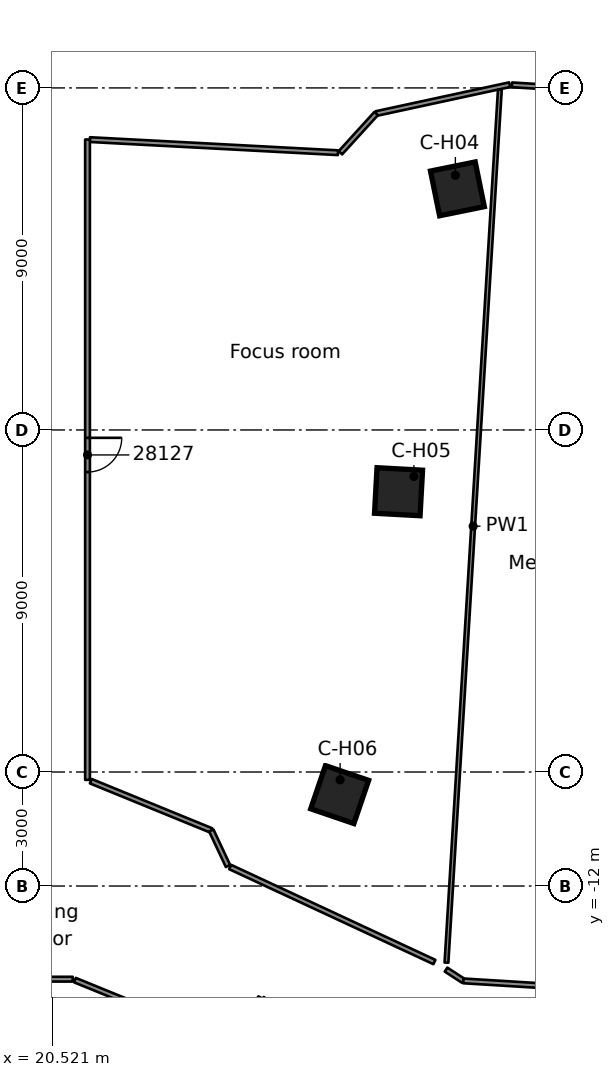
"""IFC4 building model, lengths in metres.
Left out: names, types, materials, properties, quantities, classifications, styles, units other than length and angle.
Written with IfcOpenShell. Run it as: python <this file> out.ifc"""

import sys

from ifc_helpers import new_model, si_unit, direction, frame, frame_2d, origin, origin_2d, place, context, subcontext, project, spatial, rectangle, extrude, element, fill, save


model = new_model("IFC4")
c1 = context("Model", 3, precision=1e-05, world=origin(), true_north=direction((0.0, 1.0)))
c2 = subcontext(c1, "Body", "Model", "MODEL_VIEW")
j1 = project(units=[si_unit("LENGTHUNIT", "METRE"), si_unit("PLANEANGLEUNIT", "RADIAN")], contexts=[c1])
p1 = place(None, origin())
s1 = spatial("IfcSite", under=j1, at=p1, CompositionType="ELEMENT")
p2 = place(p1, origin())
s2 = spatial("IfcBuilding", under=s1, at=p2, CompositionType="ELEMENT")
p3 = place(p2, frame((0.0, 0.0, 145.6)))
s3 = spatial("IfcBuildingStorey", under=s2, at=p3, CompositionType="ELEMENT", Elevation=145.6)
for number, where, z_axis, x_axis in (
    (1, (31.183, 6.344, 0.0), (0.0, 0.0, 1.0), (0.98, 0.199, 0.0)),
    (2, (29.634, -1.625, 0.0), (0.0, 0.0, 1.0), (0.998, -0.055, 0.0)),
    (3, (28.085, -9.594, 0.0), (0.0, 0.0, 1.0), (0.946, -0.323, 0.0)),
):
    element("IfcColumn", number, at=place(p3, frame(where, z_axis=z_axis, x_axis=x_axis)), inside=s3, PredefinedType="COLUMN", context=c2, shape_type="SweptSolid", body=[
        extrude(rectangle(XDim=1.2, YDim=1.2, at=origin_2d()), origin(), (0.0, 0.0, 1.0), 3.5),
    ])
p4 = place(p3, frame((26.05, -14.969, 0.0), z_axis=(0.0, 0.0, 1.0), x_axis=(0.802733003706, -0.596338599087, 0.0)))
e4 = element("IfcWall", 4, at=p4, inside=s3, PredefinedType="PARTITIONING", context=c2, shape_type="SweptSolid", body=[
    extrude(rectangle(XDim=4.927, YDim=0.125, at=frame_2d((2.463, 0.0))), origin(), (0.0, 0.0, 1.0), 3.08),
])
p5 = place(p3, frame((30.578, -14.0, 0.0), z_axis=(0.0, 0.0, 1.0), x_axis=(-0.906684476779, 0.421809506257, 0.0)))
e5 = element("IfcWall", 5, at=p5, inside=s3, PredefinedType="PARTITIONING", context=c2, shape_type="SweptSolid", body=[
    extrude(rectangle(XDim=5.927, YDim=0.125, at=frame_2d((2.963, 0.0))), origin(), (0.0, 0.0, 1.0), 3.08),
])
p6 = place(p3, frame((30.884, -14.199, 0.0), z_axis=(0.0, 0.0, 1.0), x_axis=(0.838402684299, -0.545051317731, 0.0)))
e6 = element("IfcWall", 6, at=p6, inside=s3, PredefinedType="PARTITIONING", context=c2, shape_type="SweptSolid", body=[
    extrude(rectangle(XDim=0.545, YDim=0.125, at=frame_2d((0.272, 0.0))), origin(), (0.0, 0.0, 1.0), 3.08),
])
p7 = place(p3, frame((21.118, -14.475, 0.0), z_axis=(0.0, 0.0, 1.0), x_axis=(0.925826662129, -0.377948398187, 0.0)))
e7 = element("IfcWall", 7, at=p7, inside=s3, PredefinedType="PARTITIONING", context=c2, shape_type="SweptSolid", body=[
    extrude(rectangle(XDim=4.487, YDim=0.125, at=frame_2d((2.243, 0.0))), origin(), (0.0, 0.0, 1.0), 3.08),
])
p8 = place(p3, frame((21.536, -9.242, 0.0), z_axis=(0.0, 0.0, 1.0), x_axis=(0.925663837475, -0.37834701002, 0.0)))
e8 = element("IfcWall", 8, at=p8, inside=s3, PredefinedType="PARTITIONING", context=c2, shape_type="SweptSolid", body=[
    extrude(rectangle(XDim=3.426, YDim=0.125, at=frame_2d((1.713, 0.0))), origin(), (0.0, 0.0, 1.0), 3.08),
])
p9 = place(p3, frame((31.341, -14.496, 0.0), z_axis=(0.0, 0.0, 1.0), x_axis=(0.998121712121, -0.061262123633, 0.0)))
e9 = element("IfcWall", 9, at=p9, inside=s3, PredefinedType="PARTITIONING", context=c2, shape_type="SweptSolid", body=[
    extrude(rectangle(XDim=11.262, YDim=0.125, at=frame_2d((5.631, 0.0))), origin(), (0.0, 0.0, 1.0), 3.08),
])
p10 = place(p9, frame((3.6, 0.0, 0.0)))
e10 = element("IfcOpeningElement", 10, at=p10, cuts=e9, PredefinedType="OPENING", context=c2, shape_type="SweptSolid", body=[
    extrude(rectangle(XDim=0.9, YDim=2.1, at=frame_2d((0.45, 1.05))), frame((0.0, 0.073, 0.0), z_axis=(0.0, -1.0, 0.0), x_axis=(1.0, 0.0, 0.0)), (0.0, 0.0, 1.0), 0.145),
])
p11 = place(p3, frame((37.546, 8.78, 0.0), z_axis=(0.0, 0.0, 1.0), x_axis=(-0.998138783045, 0.060983356598, 0.0)))
e11 = element("IfcWall", 11, at=p11, inside=s3, PredefinedType="PARTITIONING", context=c2, shape_type="SweptSolid", body=[
    extrude(rectangle(XDim=4.936, YDim=0.125, at=frame_2d((2.468, 0.0))), origin(), (0.0, 0.0, 1.0), 3.08),
])
p12 = place(p11, frame((1.955, 0.0, 0.0)))
e12 = element("IfcOpeningElement", 12, at=p12, cuts=e11, PredefinedType="OPENING", context=c2, shape_type="SweptSolid", body=[
    extrude(rectangle(XDim=0.9, YDim=2.1, at=frame_2d((0.45, 1.05))), frame((0.0, 0.073, 0.0), z_axis=(0.0, -1.0, 0.0), x_axis=(1.0, 0.0, 0.0)), (0.0, 0.0, 1.0), 0.145),
])
p13 = place(p3, frame((21.512, 7.64, 0.0), z_axis=(0.0, 0.0, 1.0), x_axis=(0.998607080765, -0.052762659579, 0.0)))
e13 = element("IfcWall", 13, at=p13, inside=s3, PredefinedType="PARTITIONING", context=c2, shape_type="SweptSolid", body=[
    extrude(rectangle(XDim=6.538, YDim=0.125, at=frame_2d((3.269, 0.0))), origin(), (0.0, 0.0, 1.0), 3.08),
])
p14 = place(p3, frame((21.06, -14.451, 0.0), z_axis=(0.0, 0.0, 1.0), x_axis=(-1.0, 0.0, 0.0)))
e14 = element("IfcWall", 14, at=p14, inside=s3, PredefinedType="PARTITIONING", context=c2, shape_type="SweptSolid", body=[
    extrude(rectangle(XDim=10.669, YDim=0.125, at=frame_2d((5.334, 0.0))), origin(), (0.0, 0.0, 1.0), 3.08),
])
p15 = place(p14, frame((4.85, 0.0, 0.0)))
e15 = element("IfcOpeningElement", 15, at=p15, cuts=e14, PredefinedType="OPENING", context=c2, shape_type="SweptSolid", body=[
    extrude(rectangle(XDim=0.9, YDim=2.1, at=frame_2d((0.45, 1.05))), frame((0.0, 0.073, 0.0), z_axis=(0.0, -1.0, 0.0), x_axis=(1.0, 0.0, 0.0)), (0.0, 0.0, 1.0), 0.145),
])
p16 = place(p3, frame((29.044, 8.325, 0.0), z_axis=(0.0, 0.0, 1.0), x_axis=(0.977387992434, 0.211453806411, 0.0)))
e16 = element("IfcWall", 16, at=p16, inside=s3, PredefinedType="PARTITIONING", context=c2, shape_type="SweptSolid", body=[
    extrude(rectangle(XDim=3.594, YDim=0.125, at=frame_2d((1.797, 0.0))), origin(), (0.0, 0.0, 1.0), 3.08),
])
p17 = place(p3, frame((26.0, -14.932, 0.0), z_axis=(0.0, 0.0, 1.0), x_axis=(-0.469063701963, -0.883164335501, 0.0)))
e17 = element("IfcWall", 17, at=p17, inside=s3, PredefinedType="PARTITIONING", context=c2, shape_type="SweptSolid", body=[
    extrude(rectangle(XDim=1.43, YDim=0.125, at=frame_2d((0.715, 0.0))), origin(), (0.0, 0.0, 1.0), 3.08),
])
p18 = place(p3, frame((25.147, -11.474, 0.0), z_axis=(0.0, 0.0, 1.0), x_axis=(-0.425365006665, 0.905021884324, 0.0)))
e18 = element("IfcWall", 18, at=p18, inside=s3, PredefinedType="PARTITIONING", context=c2, shape_type="SweptSolid", body=[
    extrude(rectangle(XDim=1.034, YDim=0.125, at=frame_2d((0.517, 0.0))), origin(), (0.0, 0.0, 1.0), 3.08),
])
p19 = place(p3, frame((30.895, -14.015, 0.0), z_axis=(0.0, 0.0, 1.0), x_axis=(0.061064974054, 0.998133793108, 0.0)))
e19 = element("IfcWall", 19, at=p19, inside=s3, PredefinedType="PARTITIONING", context=c2, shape_type="SweptSolid", body=[
    extrude(rectangle(XDim=23.009, YDim=0.1, at=frame_2d((11.504, 0.0))), origin(), (0.0, 0.0, 1.0), 3.08),
])
p20 = place(p3, frame((28.104, 7.293, 0.0), z_axis=(0.0, 0.0, 1.0), x_axis=(0.673368934503, 0.739306619777, 0.0)))
e20 = element("IfcWall", 20, at=p20, inside=s3, PredefinedType="PARTITIONING", context=c2, shape_type="SweptSolid", body=[
    extrude(rectangle(XDim=1.396, YDim=0.125, at=frame_2d((0.698, 0.0))), origin(), (0.0, 0.0, 1.0), 3.08),
])
p21 = place(p3, frame((21.45, 7.643, 0.0), z_axis=(0.0, 0.0, 1.0), x_axis=(0.0, -1.0, 0.0)))
e21 = element("IfcWall", 21, at=p21, inside=s3, PredefinedType="PARTITIONING", context=c2, shape_type="SweptSolid", body=[
    extrude(rectangle(XDim=16.85, YDim=0.125, at=frame_2d((8.425, 0.0))), origin(), (0.0, 0.0, 1.0), 3.08),
])
p22 = place(p21, frame((7.85, 0.0, 0.0)))
e22 = element("IfcOpeningElement", 22, at=p22, cuts=e21, PredefinedType="OPENING", context=c2, shape_type="SweptSolid", body=[
    extrude(rectangle(XDim=0.9, YDim=2.1, at=frame_2d((0.45, 1.05))), frame((0.0, 0.073, 0.0), z_axis=(0.0, -1.0, 0.0), x_axis=(1.0, 0.0, 0.0)), (0.0, 0.0, 1.0), 0.145),
])
p23 = place(p22, origin())
e23 = element("IfcDoor", 23, at=p23, inside=s3, OperationType="SINGLE_SWING_LEFT", PredefinedType="DOOR", context=c2, shape_type="SweptSolid", body=[
    extrude(rectangle(XDim=0.9, YDim=2.1, at=frame_2d((0.45, 1.05))), frame((0.0, 0.025, 0.0), z_axis=(0.0, -1.0, 0.0), x_axis=(1.0, 0.0, 0.0)), (0.0, 0.0, 1.0), 0.05),
])
fill(e22, e23)
save(model, sys.argv[1])
